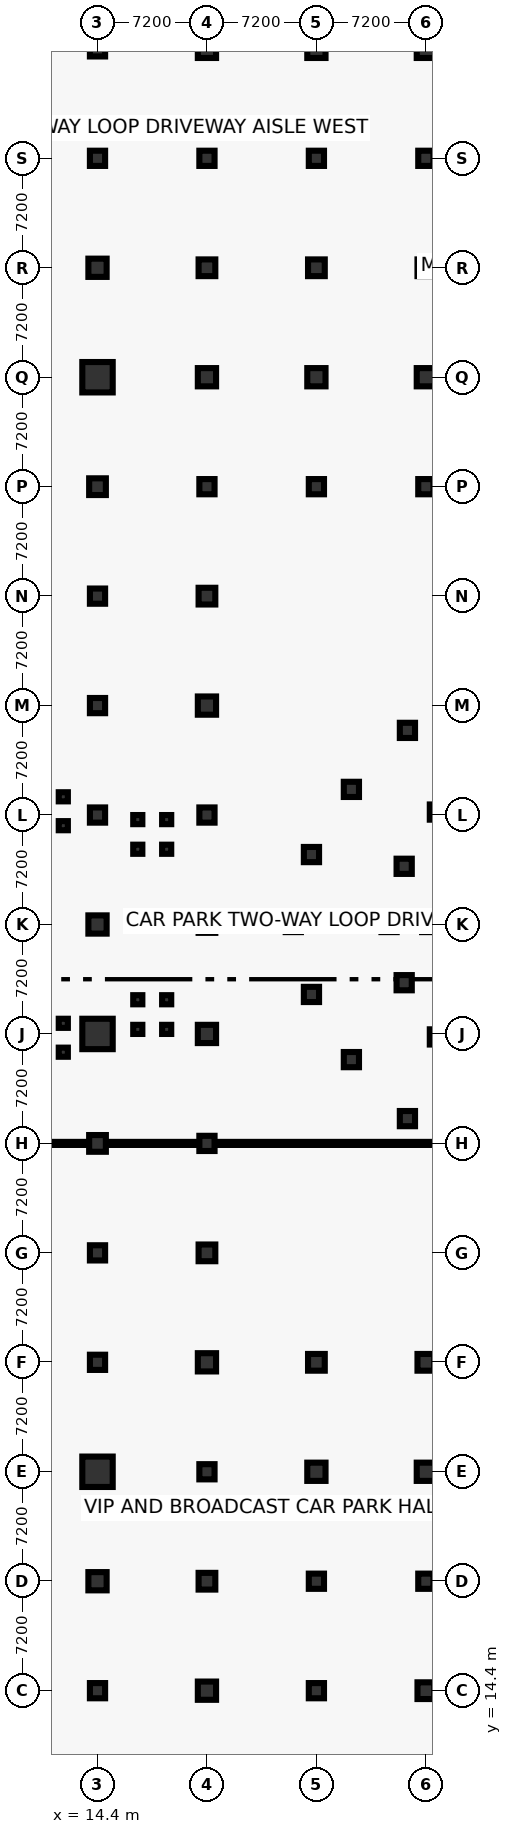
"""IFC4 building model, lengths in metres.
Left out: names, types, materials, properties, quantities, classifications, styles, units other than length and angle.
Written with IfcOpenShell. Run it as: python <this file> out.ifc"""

import sys

from ifc_helpers import new_model, si_unit, direction, frame, frame_2d, origin, origin_2d, place, context, subcontext, project, spatial, rectangle, circle, extrude, element, save


model = new_model("IFC4")
c1 = context("Model", 3, precision=1e-05, world=origin(), true_north=direction((0.0, 1.0)))
c2 = subcontext(c1, "Body", "Model", "MODEL_VIEW")
j1 = project(units=[si_unit("LENGTHUNIT", "METRE"), si_unit("PLANEANGLEUNIT", "RADIAN")], contexts=[c1])
p1 = place(None, origin())
s1 = spatial("IfcSite", under=j1, at=p1, CompositionType="ELEMENT")
p2 = place(p1, origin())
s2 = spatial("IfcBuilding", under=s1, at=p2, CompositionType="ELEMENT")
p3 = place(p2, frame((0.0, 0.0, -5.4)))
s3 = spatial("IfcBuildingStorey", under=s2, at=p3, CompositionType="ELEMENT", Elevation=-5.4)
p4 = place(p3, frame((14.4, 14.4, 0.0), z_axis=(0.0, 0.0, 1.0), x_axis=(1.0, 0.0, 0.0)))
e1 = element("IfcColumn", 1, at=p4, inside=s3, PredefinedType="COLUMN", context=c2, shape_type="SweptSolid", body=[
    extrude(circle(Radius=0.5, at=origin_2d()), origin(), (0.0, 0.0, 1.0), 5.4),
])
p5 = place(p3, frame((14.4, 21.6, 0.0), z_axis=(0.0, 0.0, 1.0), x_axis=(1.0, 0.0, 0.0)))
e2 = element("IfcColumn", 2, at=p5, inside=s3, PredefinedType="COLUMN", context=c2, shape_type="SweptSolid", body=[
    extrude(circle(Radius=0.6, at=origin_2d()), origin(), (0.0, 0.0, 1.0), 5.4),
])
p6 = place(p3, frame((14.4, 28.8, 0.0), z_axis=(0.0, 0.0, 1.0), x_axis=(1.0, 0.0, 0.0)))
e3 = element("IfcColumn", 3, at=p6, inside=s3, PredefinedType="COLUMN", context=c2, shape_type="SweptSolid", body=[
    extrude(circle(Radius=1.0, at=origin_2d()), origin(), (0.0, 0.0, 1.0), 5.4),
])
p7 = place(p3, frame((14.4, 36.0, 0.0), z_axis=(0.0, 0.0, 1.0), x_axis=(1.0, 0.0, 0.0)))
e4 = element("IfcColumn", 4, at=p7, inside=s3, PredefinedType="COLUMN", context=c2, shape_type="SweptSolid", body=[
    extrude(rectangle(XDim=1.0, YDim=1.0, at=origin_2d()), origin(), (0.0, 0.0, 1.0), 5.4),
])
p8 = place(p3, frame((14.4, 43.2, 0.0), z_axis=(0.0, 0.0, 1.0), x_axis=(1.0, 0.0, 0.0)))
e5 = element("IfcColumn", 5, at=p8, inside=s3, PredefinedType="COLUMN", context=c2, shape_type="SweptSolid", body=[
    extrude(circle(Radius=0.5, at=origin_2d()), origin(), (0.0, 0.0, 1.0), 5.4),
])
p9 = place(p3, frame((14.4, 50.4, 0.0), z_axis=(0.0, 0.0, 1.0), x_axis=(1.0, 0.0, 0.0)))
e6 = element("IfcColumn", 6, at=p9, inside=s3, PredefinedType="COLUMN", context=c2, shape_type="SweptSolid", body=[
    extrude(rectangle(XDim=1.1, YDim=1.1, at=origin_2d()), origin(), (0.0, 0.0, 1.0), 5.4),
])
p10 = place(p3, frame((14.4, 57.6, 0.0), z_axis=(0.0, 0.0, 1.0), x_axis=(1.0, 0.0, 0.0)))
e7 = element("IfcColumn", 7, at=p10, inside=s3, PredefinedType="COLUMN", context=c2, shape_type="SweptSolid", body=[
    extrude(circle(Radius=1.0, at=origin_2d()), origin(), (0.0, 0.0, 1.0), 5.4),
])
p11 = place(p3, frame((14.4, 64.8, 0.0), z_axis=(0.0, 0.0, 1.0), x_axis=(1.0, 0.0, 0.0)))
e8 = element("IfcColumn", 8, at=p11, inside=s3, PredefinedType="COLUMN", context=c2, shape_type="SweptSolid", body=[
    extrude(circle(Radius=0.6, at=origin_2d()), origin(), (0.0, 0.0, 1.0), 5.4),
])
p12 = place(p3, frame((14.4, 72.0, 0.0), z_axis=(0.0, 0.0, 1.0), x_axis=(1.0, 0.0, 0.0)))
e9 = element("IfcColumn", 9, at=p12, inside=s3, PredefinedType="COLUMN", context=c2, shape_type="SweptSolid", body=[
    extrude(circle(Radius=0.5, at=origin_2d()), origin(), (0.0, 0.0, 1.0), 5.4),
])
p13 = place(p3, frame((14.4, 79.2, 0.0), z_axis=(0.0, 0.0, 1.0), x_axis=(1.0, 0.0, 0.0)))
e10 = element("IfcColumn", 10, at=p13, inside=s3, PredefinedType="COLUMN", context=c2, shape_type="SweptSolid", body=[
    extrude(rectangle(XDim=1.0, YDim=1.0, at=origin_2d()), origin(), (0.0, 0.0, 1.0), 5.4),
])
p14 = place(p3, frame((14.4, 86.4, 0.0), z_axis=(0.0, 0.0, 1.0), x_axis=(1.0, 0.0, 0.0)))
e11 = element("IfcColumn", 11, at=p14, inside=s3, PredefinedType="COLUMN", context=c2, shape_type="SweptSolid", body=[
    extrude(circle(Radius=0.5, at=origin_2d()), origin(), (0.0, 0.0, 1.0), 5.4),
])
p15 = place(p3, frame((14.4, 93.6, 0.0), z_axis=(0.0, 0.0, 1.0), x_axis=(1.0, 0.0, 0.0)))
e12 = element("IfcColumn", 12, at=p15, inside=s3, PredefinedType="COLUMN", context=c2, shape_type="SweptSolid", body=[
    extrude(rectangle(XDim=1.1, YDim=1.1, at=origin_2d()), origin(), (0.0, 0.0, 1.0), 5.4),
])
p16 = place(p3, frame((14.4, 100.8, 0.0), z_axis=(0.0, 0.0, 1.0), x_axis=(1.0, 0.0, 0.0)))
e13 = element("IfcColumn", 13, at=p16, inside=s3, PredefinedType="COLUMN", context=c2, shape_type="SweptSolid", body=[
    extrude(circle(Radius=1.0, at=origin_2d()), origin(), (0.0, 0.0, 1.0), 5.4),
])
p17 = place(p3, frame((14.4, 108.0, 0.0), z_axis=(0.0, 0.0, 1.0), x_axis=(1.0, 0.0, 0.0)))
e14 = element("IfcColumn", 14, at=p17, inside=s3, PredefinedType="COLUMN", context=c2, shape_type="SweptSolid", body=[
    extrude(circle(Radius=0.6, at=origin_2d()), origin(), (0.0, 0.0, 1.0), 5.4),
])
p18 = place(p3, frame((14.4, 115.2, 0.0), z_axis=(0.0, 0.0, 1.0), x_axis=(1.0, 0.0, 0.0)))
e15 = element("IfcColumn", 15, at=p18, inside=s3, PredefinedType="COLUMN", context=c2, shape_type="SweptSolid", body=[
    extrude(circle(Radius=0.5, at=origin_2d()), origin(), (0.0, 0.0, 1.0), 5.4),
])
p19 = place(p3, frame((14.4, 122.4, 0.0), z_axis=(0.0, 0.0, 1.0), x_axis=(1.0, 0.0, 0.0)))
e16 = element("IfcColumn", 16, at=p19, inside=s3, PredefinedType="COLUMN", context=c2, shape_type="SweptSolid", body=[
    extrude(rectangle(XDim=1.0, YDim=1.0, at=origin_2d()), origin(), (0.0, 0.0, 1.0), 5.4),
])
p20 = place(p3, frame((21.6, 14.4, 0.0), z_axis=(0.0, 0.0, 1.0), x_axis=(1.0, 0.0, 0.0)))
e17 = element("IfcColumn", 17, at=p20, inside=s3, PredefinedType="COLUMN", context=c2, shape_type="SweptSolid", body=[
    extrude(circle(Radius=0.6, at=origin_2d()), origin(), (0.0, 0.0, 1.0), 5.4),
])
p21 = place(p3, frame((21.6, 21.6, 0.0), z_axis=(0.0, 0.0, 1.0), x_axis=(1.0, 0.0, 0.0)))
e18 = element("IfcColumn", 18, at=p21, inside=s3, PredefinedType="COLUMN", context=c2, shape_type="SweptSolid", body=[
    extrude(rectangle(XDim=1.1, YDim=1.1, at=origin_2d()), origin(), (0.0, 0.0, 1.0), 5.4),
])
p22 = place(p3, frame((21.6, 28.8, 0.0), z_axis=(0.0, 0.0, 1.0), x_axis=(1.0, 0.0, 0.0)))
e19 = element("IfcColumn", 19, at=p22, inside=s3, PredefinedType="COLUMN", context=c2, shape_type="SweptSolid", body=[
    extrude(rectangle(XDim=1.0, YDim=1.0, at=origin_2d()), origin(), (0.0, 0.0, 1.0), 5.4),
])
p23 = place(p3, frame((21.6, 36.0, 0.0), z_axis=(0.0, 0.0, 1.0), x_axis=(1.0, 0.0, 0.0)))
e20 = element("IfcColumn", 20, at=p23, inside=s3, PredefinedType="COLUMN", context=c2, shape_type="SweptSolid", body=[
    extrude(circle(Radius=0.6, at=origin_2d()), origin(), (0.0, 0.0, 1.0), 5.4),
])
p24 = place(p3, frame((21.6, 43.2, 0.0), z_axis=(0.0, 0.0, 1.0), x_axis=(1.0, 0.0, 0.0)))
e21 = element("IfcColumn", 21, at=p24, inside=s3, PredefinedType="COLUMN", context=c2, shape_type="SweptSolid", body=[
    extrude(rectangle(XDim=1.1, YDim=1.1, at=origin_2d()), origin(), (0.0, 0.0, 1.0), 5.4),
])
p25 = place(p3, frame((21.6, 50.4, 0.0), z_axis=(0.0, 0.0, 1.0), x_axis=(1.0, 0.0, 0.0)))
e22 = element("IfcColumn", 22, at=p25, inside=s3, PredefinedType="COLUMN", context=c2, shape_type="SweptSolid", body=[
    extrude(rectangle(XDim=1.0, YDim=1.0, at=origin_2d()), origin(), (0.0, 0.0, 1.0), 5.4),
])
p26 = place(p3, frame((21.6, 57.6, 0.0), z_axis=(0.0, 0.0, 1.0), x_axis=(1.0, 0.0, 0.0)))
e23 = element("IfcColumn", 23, at=p26, inside=s3, PredefinedType="COLUMN", context=c2, shape_type="SweptSolid", body=[
    extrude(circle(Radius=0.6, at=origin_2d()), origin(), (0.0, 0.0, 1.0), 5.4),
])
p27 = place(p3, frame((21.6, 64.8, 0.0), z_axis=(0.0, 0.0, 1.0), x_axis=(1.0, 0.0, 0.0)))
e24 = element("IfcColumn", 24, at=p27, inside=s3, PredefinedType="COLUMN", context=c2, shape_type="SweptSolid", body=[
    extrude(rectangle(XDim=1.1, YDim=1.1, at=origin_2d()), origin(), (0.0, 0.0, 1.0), 5.4),
])
p28 = place(p3, frame((21.6, 72.0, 0.0), z_axis=(0.0, 0.0, 1.0), x_axis=(1.0, 0.0, 0.0)))
e25 = element("IfcColumn", 25, at=p28, inside=s3, PredefinedType="COLUMN", context=c2, shape_type="SweptSolid", body=[
    extrude(rectangle(XDim=1.0, YDim=1.0, at=origin_2d()), origin(), (0.0, 0.0, 1.0), 5.4),
])
p29 = place(p3, frame((21.6, 79.2, 0.0), z_axis=(0.0, 0.0, 1.0), x_axis=(1.0, 0.0, 0.0)))
e26 = element("IfcColumn", 26, at=p29, inside=s3, PredefinedType="COLUMN", context=c2, shape_type="SweptSolid", body=[
    extrude(circle(Radius=0.6, at=origin_2d()), origin(), (0.0, 0.0, 1.0), 5.4),
])
p30 = place(p3, frame((21.6, 86.4, 0.0), z_axis=(0.0, 0.0, 1.0), x_axis=(1.0, 0.0, 0.0)))
e27 = element("IfcColumn", 27, at=p30, inside=s3, PredefinedType="COLUMN", context=c2, shape_type="SweptSolid", body=[
    extrude(rectangle(XDim=1.1, YDim=1.1, at=origin_2d()), origin(), (0.0, 0.0, 1.0), 5.4),
])
p31 = place(p3, frame((21.6, 93.6, 0.0), z_axis=(0.0, 0.0, 1.0), x_axis=(1.0, 0.0, 0.0)))
e28 = element("IfcColumn", 28, at=p31, inside=s3, PredefinedType="COLUMN", context=c2, shape_type="SweptSolid", body=[
    extrude(rectangle(XDim=1.0, YDim=1.0, at=origin_2d()), origin(), (0.0, 0.0, 1.0), 5.4),
])
p32 = place(p3, frame((21.6, 100.8, 0.0), z_axis=(0.0, 0.0, 1.0), x_axis=(1.0, 0.0, 0.0)))
e29 = element("IfcColumn", 29, at=p32, inside=s3, PredefinedType="COLUMN", context=c2, shape_type="SweptSolid", body=[
    extrude(circle(Radius=0.6, at=origin_2d()), origin(), (0.0, 0.0, 1.0), 5.4),
])
p33 = place(p3, frame((21.6, 108.0, 0.0), z_axis=(0.0, 0.0, 1.0), x_axis=(1.0, 0.0, 0.0)))
e30 = element("IfcColumn", 30, at=p33, inside=s3, PredefinedType="COLUMN", context=c2, shape_type="SweptSolid", body=[
    extrude(rectangle(XDim=1.1, YDim=1.1, at=origin_2d()), origin(), (0.0, 0.0, 1.0), 5.4),
])
p34 = place(p3, frame((21.6, 115.2, 0.0), z_axis=(0.0, 0.0, 1.0), x_axis=(1.0, 0.0, 0.0)))
e31 = element("IfcColumn", 31, at=p34, inside=s3, PredefinedType="COLUMN", context=c2, shape_type="SweptSolid", body=[
    extrude(rectangle(XDim=1.0, YDim=1.0, at=origin_2d()), origin(), (0.0, 0.0, 1.0), 5.4),
])
p35 = place(p3, frame((21.6, 122.4, 0.0), z_axis=(0.0, 0.0, 1.0), x_axis=(1.0, 0.0, 0.0)))
e32 = element("IfcColumn", 32, at=p35, inside=s3, PredefinedType="COLUMN", context=c2, shape_type="SweptSolid", body=[
    extrude(circle(Radius=0.6, at=origin_2d()), origin(), (0.0, 0.0, 1.0), 5.4),
])
p36 = place(p3, frame((28.8, 14.4, 0.0), z_axis=(0.0, 0.0, 1.0), x_axis=(1.0, 0.0, 0.0)))
e33 = element("IfcColumn", 33, at=p36, inside=s3, PredefinedType="COLUMN", context=c2, shape_type="SweptSolid", body=[
    extrude(circle(Radius=0.5, at=origin_2d()), origin(), (0.0, 0.0, 1.0), 5.4),
])
p37 = place(p3, frame((28.8, 21.6, 0.0), z_axis=(0.0, 0.0, 1.0), x_axis=(1.0, 0.0, 0.0)))
e34 = element("IfcColumn", 34, at=p37, inside=s3, PredefinedType="COLUMN", context=c2, shape_type="SweptSolid", body=[
    extrude(rectangle(XDim=1.0, YDim=1.0, at=origin_2d()), origin(), (0.0, 0.0, 1.0), 5.4),
])
p38 = place(p3, frame((28.8, 28.8, 0.0), z_axis=(0.0, 0.0, 1.0), x_axis=(1.0, 0.0, 0.0)))
e35 = element("IfcColumn", 35, at=p38, inside=s3, PredefinedType="COLUMN", context=c2, shape_type="SweptSolid", body=[
    extrude(circle(Radius=0.6, at=origin_2d()), origin(), (0.0, 0.0, 1.0), 5.4),
])
p39 = place(p3, frame((28.8, 36.0, 0.0), z_axis=(0.0, 0.0, 1.0), x_axis=(1.0, 0.0, 0.0)))
e36 = element("IfcColumn", 36, at=p39, inside=s3, PredefinedType="COLUMN", context=c2, shape_type="SweptSolid", body=[
    extrude(rectangle(XDim=1.1, YDim=1.1, at=origin_2d()), origin(), (0.0, 0.0, 1.0), 5.4),
])
p40 = place(p3, frame((28.8, 93.6, 0.0), z_axis=(0.0, 0.0, 1.0), x_axis=(1.0, 0.0, 0.0)))
e37 = element("IfcColumn", 37, at=p40, inside=s3, PredefinedType="COLUMN", context=c2, shape_type="SweptSolid", body=[
    extrude(rectangle(XDim=1.0, YDim=1.0, at=origin_2d()), origin(), (0.0, 0.0, 1.0), 5.4),
])
p41 = place(p3, frame((28.8, 100.8, 0.0), z_axis=(0.0, 0.0, 1.0), x_axis=(1.0, 0.0, 0.0)))
e38 = element("IfcColumn", 38, at=p41, inside=s3, PredefinedType="COLUMN", context=c2, shape_type="SweptSolid", body=[
    extrude(circle(Radius=0.6, at=origin_2d()), origin(), (0.0, 0.0, 1.0), 5.4),
])
p42 = place(p3, frame((28.8, 108.0, 0.0), z_axis=(0.0, 0.0, 1.0), x_axis=(1.0, 0.0, 0.0)))
e39 = element("IfcColumn", 39, at=p42, inside=s3, PredefinedType="COLUMN", context=c2, shape_type="SweptSolid", body=[
    extrude(rectangle(XDim=1.1, YDim=1.1, at=origin_2d()), origin(), (0.0, 0.0, 1.0), 5.4),
])
p43 = place(p3, frame((28.8, 115.2, 0.0), z_axis=(0.0, 0.0, 1.0), x_axis=(1.0, 0.0, 0.0)))
e40 = element("IfcColumn", 40, at=p43, inside=s3, PredefinedType="COLUMN", context=c2, shape_type="SweptSolid", body=[
    extrude(circle(Radius=0.5, at=origin_2d()), origin(), (0.0, 0.0, 1.0), 5.4),
])
p44 = place(p3, frame((28.8, 122.4, 0.0), z_axis=(0.0, 0.0, 1.0), x_axis=(1.0, 0.0, 0.0)))
e41 = element("IfcColumn", 41, at=p44, inside=s3, PredefinedType="COLUMN", context=c2, shape_type="SweptSolid", body=[
    extrude(circle(Radius=0.6, at=origin_2d()), origin(), (0.0, 0.0, 1.0), 5.4),
])
p45 = place(p3, frame((36.0, 14.4, 0.0), z_axis=(0.0, 0.0, 1.0), x_axis=(1.0, 0.0, 0.0)))
e42 = element("IfcColumn", 42, at=p45, inside=s3, PredefinedType="COLUMN", context=c2, shape_type="SweptSolid", body=[
    extrude(rectangle(XDim=1.1, YDim=1.1, at=origin_2d()), origin(), (0.0, 0.0, 1.0), 5.4),
])
p46 = place(p3, frame((36.0, 21.6, 0.0), z_axis=(0.0, 0.0, 1.0), x_axis=(1.0, 0.0, 0.0)))
e43 = element("IfcColumn", 43, at=p46, inside=s3, PredefinedType="COLUMN", context=c2, shape_type="SweptSolid", body=[
    extrude(rectangle(XDim=1.0, YDim=1.0, at=origin_2d()), origin(), (0.0, 0.0, 1.0), 5.4),
])
p47 = place(p3, frame((36.0, 28.8, 0.0), z_axis=(0.0, 0.0, 1.0), x_axis=(1.0, 0.0, 0.0)))
e44 = element("IfcColumn", 44, at=p47, inside=s3, PredefinedType="COLUMN", context=c2, shape_type="SweptSolid", body=[
    extrude(circle(Radius=0.6, at=origin_2d()), origin(), (0.0, 0.0, 1.0), 5.4),
])
p48 = place(p3, frame((36.0, 36.0, 0.0), z_axis=(0.0, 0.0, 1.0), x_axis=(1.0, 0.0, 0.0)))
e45 = element("IfcColumn", 45, at=p48, inside=s3, PredefinedType="COLUMN", context=c2, shape_type="SweptSolid", body=[
    extrude(rectangle(XDim=1.1, YDim=1.1, at=origin_2d()), origin(), (0.0, 0.0, 1.0), 5.4),
])
p49 = place(p3, frame((36.0, 93.6, 0.0), z_axis=(0.0, 0.0, 1.0), x_axis=(1.0, 0.0, 0.0)))
e46 = element("IfcColumn", 46, at=p49, inside=s3, PredefinedType="COLUMN", context=c2, shape_type="SweptSolid", body=[
    extrude(rectangle(XDim=1.0, YDim=1.0, at=origin_2d()), origin(), (0.0, 0.0, 1.0), 5.4),
])
p50 = place(p3, frame((36.0, 100.8, 0.0), z_axis=(0.0, 0.0, 1.0), x_axis=(1.0, 0.0, 0.0)))
e47 = element("IfcColumn", 47, at=p50, inside=s3, PredefinedType="COLUMN", context=c2, shape_type="SweptSolid", body=[
    extrude(circle(Radius=0.6, at=origin_2d()), origin(), (0.0, 0.0, 1.0), 5.4),
])
p51 = place(p3, frame((36.0, 108.0, 0.0), z_axis=(0.0, 0.0, 1.0), x_axis=(1.0, 0.0, 0.0)))
e48 = element("IfcColumn", 48, at=p51, inside=s3, PredefinedType="COLUMN", context=c2, shape_type="SweptSolid", body=[
    extrude(rectangle(XDim=1.1, YDim=1.1, at=origin_2d()), origin(), (0.0, 0.0, 1.0), 5.4),
])
p52 = place(p3, frame((36.0, 115.2, 0.0), z_axis=(0.0, 0.0, 1.0), x_axis=(1.0, 0.0, 0.0)))
e49 = element("IfcColumn", 49, at=p52, inside=s3, PredefinedType="COLUMN", context=c2, shape_type="SweptSolid", body=[
    extrude(rectangle(XDim=1.0, YDim=1.0, at=origin_2d()), origin(), (0.0, 0.0, 1.0), 5.4),
])
p53 = place(p3, frame((36.0, 122.4, 0.0), z_axis=(0.0, 0.0, 1.0), x_axis=(1.0, 0.0, 0.0)))
e50 = element("IfcColumn", 50, at=p53, inside=s3, PredefinedType="COLUMN", context=c2, shape_type="SweptSolid", body=[
    extrude(circle(Radius=0.6, at=origin_2d()), origin(), (0.0, 0.0, 1.0), 5.4),
])
for number, where, z_axis, x_axis in (
    (51, (12.15, 56.4, 0.0), (0.0, 0.0, 1.0), (1.0, 0.0, 0.0)),
    (52, (12.15, 58.3, 0.0), (0.0, 0.0, 1.0), (1.0, 0.0, 0.0)),
    (53, (12.15, 71.3, 0.0), (0.0, 0.0, 1.0), (1.0, 0.0, 0.0)),
    (54, (12.15, 73.2, 0.0), (0.0, 0.0, 1.0), (1.0, 0.0, 0.0)),
    (55, (17.05, 57.9, 0.0), (0.0, 0.0, 1.0), (1.0, 0.0, 0.0)),
    (56, (18.95, 57.9, 0.0), (0.0, 0.0, 1.0), (1.0, 0.0, 0.0)),
    (57, (17.05, 59.85, 0.0), (0.0, 0.0, 1.0), (1.0, 0.0, 0.0)),
    (58, (18.95, 59.85, 0.0), (0.0, 0.0, 1.0), (1.0, 0.0, 0.0)),
    (59, (17.05, 69.75, 0.0), (0.0, 0.0, 1.0), (1.0, 0.0, 0.0)),
    (60, (18.95, 69.75, 0.0), (0.0, 0.0, 1.0), (1.0, 0.0, 0.0)),
    (61, (17.05, 71.7, 0.0), (0.0, 0.0, 1.0), (1.0, 0.0, 0.0)),
    (62, (18.95, 71.7, 0.0), (0.0, 0.0, 1.0), (1.0, 0.0, 0.0)),
):
    element("IfcColumn", number, at=place(p3, frame(where, z_axis=z_axis, x_axis=x_axis)), inside=s3, PredefinedType="COLUMN", context=c2, shape_type="SweptSolid", body=[
        extrude(rectangle(XDim=0.6, YDim=0.6, at=origin_2d()), origin(), (0.0, 0.0, 1.0), 5.4),
    ])
for number, where, z_axis, x_axis in (
    (63, (34.788, 77.569, 0.0), (0.0, 0.0, 1.0), (1.0, 0.0, 0.0)),
    (64, (36.76, 72.196, 0.0), (0.0, 0.0, 1.0), (1.0, 0.0, 0.0)),
    (65, (31.102, 73.688, 0.0), (0.0, 0.0, 1.0), (1.0, 0.0, 0.0)),
    (66, (34.574, 68.628, 0.0), (0.0, 0.0, 1.0), (1.0, 0.0, 0.0)),
    (67, (28.475, 69.401, 0.0), (0.0, 0.0, 1.0), (1.0, 0.0, 0.0)),
    (68, (36.252, 64.8, 0.0), (0.0, 0.0, 1.0), (1.0, 0.0, 0.0)),
    (69, (33.58, 64.8, 0.0), (0.0, 0.0, 1.0), (1.0, 0.0, 0.0)),
    (70, (27.28, 64.8, 0.0), (0.0, 0.0, 1.0), (1.0, 0.0, 0.0)),
    (71, (34.574, 60.972, 0.0), (0.0, 0.0, 1.0), (1.0, 0.0, 0.0)),
    (72, (28.475, 60.199, 0.0), (0.0, 0.0, 1.0), (1.0, 0.0, 0.0)),
    (73, (36.76, 57.404, 0.0), (0.0, 0.0, 1.0), (1.0, 0.0, 0.0)),
    (74, (31.102, 55.912, 0.0), (0.0, 0.0, 1.0), (1.0, 0.0, 0.0)),
    (75, (34.788, 52.031, 0.0), (0.0, 0.0, 1.0), (1.0, 0.0, 0.0)),
):
    element("IfcColumn", number, at=place(p3, frame(where, z_axis=z_axis, x_axis=x_axis)), inside=s3, PredefinedType="COLUMN", context=c2, shape_type="SweptSolid", body=[
        extrude(circle(Radius=0.5, at=origin_2d()), origin(), (0.0, 0.0, 1.0), 5.4),
    ])
p54 = place(p3, frame((42.0, 50.4, 0.0), z_axis=(0.0, 0.0, 1.0), x_axis=(-1.0, 0.0, 0.0)))
e76 = element("IfcWall", 76, at=p54, inside=s3, PredefinedType="PARTITIONING", context=c2, shape_type="SweptSolid", body=[
    extrude(rectangle(XDim=32.8, YDim=0.2, at=frame_2d((16.4, 0.0))), origin(), (0.0, 0.0, 1.0), 4.04),
])
save(model, sys.argv[1])
